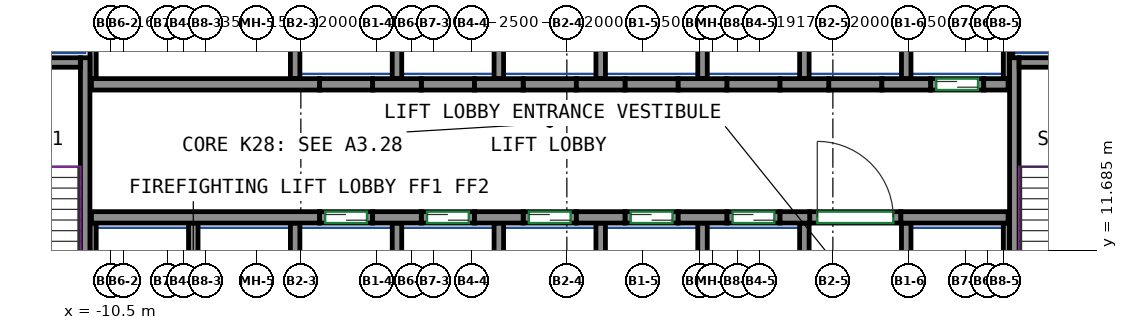
"""IFC4 building model, lengths in metres.
Left out: names, types, materials, properties, quantities, classifications, styles, units other than length and angle.
Written with IfcOpenShell. Run it as: python <this file> out.ifc"""

import sys

from ifc_helpers import new_model, si_unit, direction, frame, frame_2d, origin, place, context, subcontext, project, spatial, rectangle, extrude, source, transform, mapped, element, fill, save


model = new_model("IFC4")
c1 = context("Model", 3, precision=1e-05, world=origin(), true_north=direction((0.0, 1.0)))
c2 = subcontext(c1, "Body", "Model", "MODEL_VIEW")
j1 = project(units=[si_unit("LENGTHUNIT", "METRE"), si_unit("PLANEANGLEUNIT", "RADIAN")], contexts=[c1])
p1 = place(None, origin())
s1 = spatial("IfcSite", under=j1, at=p1, CompositionType="ELEMENT")
p2 = place(p1, origin())
s2 = spatial("IfcBuilding", under=s1, at=p2, CompositionType="ELEMENT")
p3 = place(p2, frame((0.0, 0.0, 116.6)))
s3 = spatial("IfcBuildingStorey", under=s2, at=p3, CompositionType="ELEMENT", Elevation=116.6)
m1 = source(origin(), c2, "Body", "SweptSolid", [
    extrude(rectangle(XDim=7.75, YDim=0.25, at=frame_2d((3.875, 0.0))), origin(), (0.0, 0.0, 1.0), 3.72),
])
p4 = place(p3, frame((-11.175, 9.0, 0.0), z_axis=(0.0, 0.0, 1.0), x_axis=(0.0, 1.0, 0.0)))
e1 = element("IfcWall", 1, at=p4, inside=s3, PredefinedType="SHEAR", context=c2, shape_type="MappedRepresentation", body=[
    mapped(m1, transform((0.0, 0.0, 0.0))),
])
m2 = source(origin(), c2, "Body", "SweptSolid", [
    extrude(rectangle(XDim=3.7, YDim=0.25, at=frame_2d((1.85, 0.0))), origin(), (0.0, 0.0, 1.0), 3.72),
])
p5 = place(p3, frame((-15.0, 16.625, 0.0), z_axis=(0.0, 0.0, 1.0), x_axis=(1.0, 0.0, 0.0)))
e2 = element("IfcWall", 2, at=p5, inside=s3, PredefinedType="SHEAR", context=c2, shape_type="MappedRepresentation", body=[
    mapped(m2, transform((0.0, 0.0, 0.0))),
])
p6 = place(p3, frame((13.275, 9.0, 0.0), z_axis=(0.0, 0.0, 1.0), x_axis=(0.0, 1.0, 0.0)))
e3 = element("IfcWall", 3, at=p6, inside=s3, PredefinedType="SHEAR", context=c2, shape_type="MappedRepresentation", body=[
    mapped(m1, transform((0.0, 0.0, 0.0))),
])
m3 = source(origin(), c2, "Body", "SweptSolid", [
    extrude(rectangle(XDim=3.7, YDim=0.25, at=frame_2d((1.85, 0.0))), origin(), (0.0, 0.0, 1.0), 3.72),
])
p7 = place(p3, frame((13.4, 16.625, 0.0), z_axis=(0.0, 0.0, 1.0), x_axis=(1.0, 0.0, 0.0)))
e4 = element("IfcWall", 4, at=p7, inside=s3, PredefinedType="SHEAR", context=c2, shape_type="MappedRepresentation", body=[
    mapped(m3, transform((0.0, 0.0, 0.0))),
])
m4 = source(origin(), c2, "Body", "SweptSolid", [
    extrude(rectangle(XDim=6.0, YDim=0.3, at=frame_2d((3.0, 0.0))), origin(), (0.0, 0.0, 1.0), 3.72),
])
p8 = place(p3, frame((-11.01, 12.55, 0.0), z_axis=(0.0, 0.0, 1.0), x_axis=(1.0, 0.0, 0.0)))
e5 = element("IfcWall", 5, at=p8, inside=s3, PredefinedType="SHEAR", context=c2, shape_type="MappedRepresentation", body=[
    mapped(m4, transform((0.0, 0.0, 0.0))),
])
m5 = source(origin(), c2, "Body", "SweptSolid", [
    extrude(rectangle(XDim=1.28, YDim=0.3, at=frame_2d((0.64, 0.0))), origin(), (0.0, 0.0, 1.0), 3.72),
])
for number, where, z_axis, x_axis in (
    (6, (-3.61, 12.55, 0.0), (0.0, 0.0, 1.0), (1.0, 0.0, 0.0)),
    (7, (-0.93, 12.55, 0.0), (0.0, 0.0, 1.0), (1.0, 0.0, 0.0)),
    (8, (1.75, 12.55, 0.0), (0.0, 0.0, 1.0), (1.0, 0.0, 0.0)),
    (9, (4.43, 12.55, 0.0), (0.0, 0.0, 1.0), (1.0, 0.0, 0.0)),
):
    element("IfcWall", number, at=place(p3, frame(where, z_axis=z_axis, x_axis=x_axis)), inside=s3, PredefinedType="SHEAR", context=c2, shape_type="MappedRepresentation", body=[
        mapped(m5, transform((0.0, 0.0, 0.0))),
    ])
m6 = source(origin(), c2, "Body", "SweptSolid", [
    extrude(rectangle(XDim=0.78, YDim=0.3, at=frame_2d((0.39, 0.0))), origin(), (0.0, 0.0, 1.0), 3.72),
])
p9 = place(p3, frame((7.11, 12.55, 0.0), z_axis=(0.0, 0.0, 1.0), x_axis=(1.0, 0.0, 0.0)))
e10 = element("IfcWall", 10, at=p9, inside=s3, PredefinedType="SHEAR", context=c2, shape_type="MappedRepresentation", body=[
    mapped(m6, transform((0.0, 0.0, 0.0))),
])
m7 = source(origin(), c2, "Body", "SweptSolid", [
    extrude(rectangle(XDim=2.82, YDim=0.3, at=frame_2d((1.41, 0.0))), origin(), (0.0, 0.0, 1.0), 3.72),
])
p10 = place(p3, frame((10.29, 12.55, 0.0), z_axis=(0.0, 0.0, 1.0), x_axis=(1.0, 0.0, 0.0)))
e11 = element("IfcWall", 11, at=p10, inside=s3, PredefinedType="SHEAR", context=c2, shape_type="MappedRepresentation", body=[
    mapped(m7, transform((0.0, 0.0, 0.0))),
])
p11 = place(p3, frame((-11.01, 16.05, 0.0), z_axis=(0.0, 0.0, 1.0), x_axis=(1.0, 0.0, 0.0)))
e12 = element("IfcWall", 12, at=p11, inside=s3, PredefinedType="SHEAR", context=c2, shape_type="MappedRepresentation", body=[
    mapped(m4, transform((0.0, 0.0, 0.0))),
])
for number, where, z_axis, x_axis in (
    (13, (-3.61, 16.05, 0.0), (0.0, 0.0, 1.0), (1.0, 0.0, 0.0)),
    (14, (-0.93, 16.05, 0.0), (0.0, 0.0, 1.0), (1.0, 0.0, 0.0)),
    (15, (1.75, 16.05, 0.0), (0.0, 0.0, 1.0), (1.0, 0.0, 0.0)),
    (16, (4.43, 16.05, 0.0), (0.0, 0.0, 1.0), (1.0, 0.0, 0.0)),
):
    element("IfcWall", number, at=place(p3, frame(where, z_axis=z_axis, x_axis=x_axis)), inside=s3, PredefinedType="SHEAR", context=c2, shape_type="MappedRepresentation", body=[
        mapped(m5, transform((0.0, 0.0, 0.0))),
    ])
m8 = source(origin(), c2, "Body", "SweptSolid", [
    extrude(rectangle(XDim=1.28, YDim=0.3, at=frame_2d((0.64, 0.0))), origin(), (0.0, 0.0, 1.0), 3.72),
])
p12 = place(p3, frame((7.11, 16.05, 0.0), z_axis=(0.0, 0.0, 1.0), x_axis=(1.0, 0.0, 0.0)))
e17 = element("IfcWall", 17, at=p12, inside=s3, PredefinedType="SHEAR", context=c2, shape_type="MappedRepresentation", body=[
    mapped(m8, transform((0.0, 0.0, 0.0))),
])
p13 = place(p3, frame((9.79, 16.05, 0.0), z_axis=(0.0, 0.0, 1.0), x_axis=(1.0, 0.0, 0.0)))
e18 = element("IfcWall", 18, at=p13, inside=s3, PredefinedType="SHEAR", context=c2, shape_type="MappedRepresentation", body=[
    mapped(m5, transform((0.0, 0.0, 0.0))),
])
m9 = source(origin(), c2, "Body", "SweptSolid", [
    extrude(rectangle(XDim=0.64, YDim=0.3, at=frame_2d((0.32, 0.0))), origin(), (0.0, 0.0, 1.0), 3.72),
])
p14 = place(p3, frame((12.47, 16.05, 0.0), z_axis=(0.0, 0.0, 1.0), x_axis=(1.0, 0.0, 0.0)))
e19 = element("IfcWall", 19, at=p14, inside=s3, PredefinedType="SHEAR", context=c2, shape_type="MappedRepresentation", body=[
    mapped(m9, transform((0.0, 0.0, 0.0))),
])
m10 = source(origin(), c2, "Body", "SweptSolid", [
    extrude(rectangle(XDim=1.4, YDim=0.3, at=frame_2d((0.7, 0.0))), origin(), (0.0, 0.0, 1.0), 3.72),
])
p15 = place(p3, frame((-5.01, 12.55, 0.0), z_axis=(0.0, 0.0, 1.0), x_axis=(1.0, 0.0, 0.0)))
e20 = element("IfcWall", 20, at=p15, inside=s3, PredefinedType="PARTITIONING", context=c2, shape_type="MappedRepresentation", body=[
    mapped(m10, transform((0.0, 0.0, 0.0))),
])
p16 = place(p15, frame((0.15, 0.0, 0.0)))
e21 = element("IfcOpeningElement", 21, at=p16, cuts=e20, PredefinedType="OPENING", context=c2, shape_type="SweptSolid", body=[
    extrude(rectangle(XDim=1.1, YDim=2.1, at=frame_2d((0.55, 1.05))), frame((0.0, 0.16, 0.0), z_axis=(0.0, -1.0, 0.0), x_axis=(1.0, 0.0, 0.0)), (0.0, 0.0, 1.0), 0.32),
])
m11 = source(origin(), c2, "Body", "SweptSolid", [
    extrude(rectangle(XDim=1.4, YDim=0.3, at=frame_2d((0.7, 0.0))), origin(), (0.0, 0.0, 1.0), 3.72),
])
p17 = place(p3, frame((-2.33, 12.55, 0.0), z_axis=(0.0, 0.0, 1.0), x_axis=(1.0, 0.0, 0.0)))
e22 = element("IfcWall", 22, at=p17, inside=s3, PredefinedType="PARTITIONING", context=c2, shape_type="MappedRepresentation", body=[
    mapped(m11, transform((0.0, 0.0, 0.0))),
])
p18 = place(p17, frame((0.15, 0.0, 0.0)))
e23 = element("IfcOpeningElement", 23, at=p18, cuts=e22, PredefinedType="OPENING", context=c2, shape_type="SweptSolid", body=[
    extrude(rectangle(XDim=1.1, YDim=2.1, at=frame_2d((0.55, 1.05))), frame((0.0, 0.16, 0.0), z_axis=(0.0, -1.0, 0.0), x_axis=(1.0, 0.0, 0.0)), (0.0, 0.0, 1.0), 0.32),
])
p19 = place(p3, frame((0.35, 12.55, 0.0), z_axis=(0.0, 0.0, 1.0), x_axis=(1.0, 0.0, 0.0)))
e24 = element("IfcWall", 24, at=p19, inside=s3, PredefinedType="PARTITIONING", context=c2, shape_type="MappedRepresentation", body=[
    mapped(m10, transform((0.0, 0.0, 0.0))),
])
p20 = place(p19, frame((0.15, 0.0, 0.0)))
e25 = element("IfcOpeningElement", 25, at=p20, cuts=e24, PredefinedType="OPENING", context=c2, shape_type="SweptSolid", body=[
    extrude(rectangle(XDim=1.1, YDim=2.1, at=frame_2d((0.55, 1.05))), frame((0.0, 0.16, 0.0), z_axis=(0.0, -1.0, 0.0), x_axis=(1.0, 0.0, 0.0)), (0.0, 0.0, 1.0), 0.32),
])
p21 = place(p3, frame((3.03, 12.55, 0.0), z_axis=(0.0, 0.0, 1.0), x_axis=(1.0, 0.0, 0.0)))
e26 = element("IfcWall", 26, at=p21, inside=s3, PredefinedType="PARTITIONING", context=c2, shape_type="MappedRepresentation", body=[
    mapped(m10, transform((0.0, 0.0, 0.0))),
])
p22 = place(p21, frame((0.15, 0.0, 0.0)))
e27 = element("IfcOpeningElement", 27, at=p22, cuts=e26, PredefinedType="OPENING", context=c2, shape_type="SweptSolid", body=[
    extrude(rectangle(XDim=1.1, YDim=2.1, at=frame_2d((0.55, 1.05))), frame((0.0, 0.16, 0.0), z_axis=(0.0, -1.0, 0.0), x_axis=(1.0, 0.0, 0.0)), (0.0, 0.0, 1.0), 0.32),
])
p23 = place(p3, frame((5.71, 12.55, 0.0), z_axis=(0.0, 0.0, 1.0), x_axis=(1.0, 0.0, 0.0)))
e28 = element("IfcWall", 28, at=p23, inside=s3, PredefinedType="PARTITIONING", context=c2, shape_type="MappedRepresentation", body=[
    mapped(m11, transform((0.0, 0.0, 0.0))),
])
p24 = place(p23, frame((0.15, 0.0, 0.0)))
e29 = element("IfcOpeningElement", 29, at=p24, cuts=e28, PredefinedType="OPENING", context=c2, shape_type="SweptSolid", body=[
    extrude(rectangle(XDim=1.1, YDim=2.1, at=frame_2d((0.55, 1.05))), frame((0.0, 0.16, 0.0), z_axis=(0.0, -1.0, 0.0), x_axis=(1.0, 0.0, 0.0)), (0.0, 0.0, 1.0), 0.32),
])
p25 = place(p3, frame((11.07, 16.05, 0.0), z_axis=(0.0, 0.0, 1.0), x_axis=(1.0, 0.0, 0.0)))
e30 = element("IfcWall", 30, at=p25, inside=s3, PredefinedType="PARTITIONING", context=c2, shape_type="MappedRepresentation", body=[
    mapped(m10, transform((0.0, 0.0, 0.0))),
])
p26 = place(p25, frame((0.15, 0.0, 0.0)))
e31 = element("IfcOpeningElement", 31, at=p26, cuts=e30, PredefinedType="OPENING", context=c2, shape_type="SweptSolid", body=[
    extrude(rectangle(XDim=1.1, YDim=2.1, at=frame_2d((0.55, 1.05))), frame((0.0, 0.16, 0.0), z_axis=(0.0, -1.0, 0.0), x_axis=(1.0, 0.0, 0.0)), (0.0, 0.0, 1.0), 0.32),
])
m12 = source(origin(), c2, "Body", "SweptSolid", [
    extrude(rectangle(XDim=2.4, YDim=0.3, at=frame_2d((1.2, 0.0))), origin(), (0.0, 0.0, 1.0), 3.72),
])
p27 = place(p3, frame((7.89, 12.55, 0.0), z_axis=(0.0, 0.0, 1.0), x_axis=(1.0, 0.0, 0.0)))
e32 = element("IfcWall", 32, at=p27, inside=s3, PredefinedType="PARTITIONING", context=c2, shape_type="MappedRepresentation", body=[
    mapped(m12, transform((0.0, 0.0, 0.0))),
])
p28 = place(p27, frame((0.2, 0.0, 0.0)))
e33 = element("IfcOpeningElement", 33, at=p28, cuts=e32, PredefinedType="OPENING", context=c2, shape_type="SweptSolid", body=[
    extrude(rectangle(XDim=2.0, YDim=2.1, at=frame_2d((1.0, 1.05))), frame((0.0, 0.16, 0.0), z_axis=(0.0, -1.0, 0.0), x_axis=(1.0, 0.0, 0.0)), (0.0, 0.0, 1.0), 0.32),
])
p29 = place(p3, frame((-5.01, 16.05, 0.0), z_axis=(0.0, 0.0, 1.0), x_axis=(1.0, 0.0, 0.0)))
e34 = element("IfcWall", 34, at=p29, inside=s3, PredefinedType="PARTITIONING", context=c2, shape_type="MappedRepresentation", body=[
    mapped(m10, transform((0.0, 0.0, 0.0))),
])
p30 = place(p3, frame((-2.33, 16.05, 0.0), z_axis=(0.0, 0.0, 1.0), x_axis=(1.0, 0.0, 0.0)))
e35 = element("IfcWall", 35, at=p30, inside=s3, PredefinedType="PARTITIONING", context=c2, shape_type="MappedRepresentation", body=[
    mapped(m11, transform((0.0, 0.0, 0.0))),
])
for number, where, z_axis, x_axis in (
    (36, (0.35, 16.05, 0.0), (0.0, 0.0, 1.0), (1.0, 0.0, 0.0)),
    (37, (3.03, 16.05, 0.0), (0.0, 0.0, 1.0), (1.0, 0.0, 0.0)),
):
    element("IfcWall", number, at=place(p3, frame(where, z_axis=z_axis, x_axis=x_axis)), inside=s3, PredefinedType="PARTITIONING", context=c2, shape_type="MappedRepresentation", body=[
        mapped(m10, transform((0.0, 0.0, 0.0))),
    ])
for number, where, z_axis, x_axis in (
    (38, (5.71, 16.05, 0.0), (0.0, 0.0, 1.0), (1.0, 0.0, 0.0)),
    (39, (8.39, 16.05, 0.0), (0.0, 0.0, 1.0), (1.0, 0.0, 0.0)),
):
    element("IfcWall", number, at=place(p3, frame(where, z_axis=z_axis, x_axis=x_axis)), inside=s3, PredefinedType="PARTITIONING", context=c2, shape_type="MappedRepresentation", body=[
        mapped(m11, transform((0.0, 0.0, 0.0))),
    ])
m13 = source(origin(), c2, "Body", "SweptSolid", [
    extrude(rectangle(XDim=3.275, YDim=0.165, at=frame_2d((1.638, 0.0))), origin(), (0.0, 0.0, 1.0), 3.72),
])
p31 = place(p3, frame((13.067, 16.2, 0.0), z_axis=(0.0, 0.0, 1.0), x_axis=(0.0, 1.0, 0.0)))
e40 = element("IfcWall", 40, at=p31, inside=s3, PredefinedType="PARTITIONING", context=c2, shape_type="MappedRepresentation", body=[
    mapped(m13, transform((0.0, 0.0, 0.0))),
])
m14 = source(origin(), c2, "Body", "SweptSolid", [
    extrude(rectangle(XDim=4.8, YDim=0.165, at=frame_2d((2.4, 0.0))), origin(), (0.0, 0.0, 1.0), 3.72),
])
p32 = place(p3, frame((-10.968, 16.2, 0.0), z_axis=(0.0, 0.0, 1.0), x_axis=(0.0, 1.0, 0.0)))
e41 = element("IfcWall", 41, at=p32, inside=s3, PredefinedType="PARTITIONING", context=c2, shape_type="MappedRepresentation", body=[
    mapped(m14, transform((0.0, 0.0, 0.0))),
])
m15 = source(origin(), c2, "Body", "SweptSolid", [
    extrude(rectangle(XDim=3.275, YDim=0.25, at=frame_2d((1.638, 0.0))), origin(), (0.0, 0.0, 1.0), 3.72),
])
p33 = place(p3, frame((10.43, 16.2, 0.0), z_axis=(0.0, 0.0, 1.0), x_axis=(0.0, 1.0, 0.0)))
e42 = element("IfcWall", 42, at=p33, inside=s3, PredefinedType="PARTITIONING", context=c2, shape_type="MappedRepresentation", body=[
    mapped(m15, transform((0.0, 0.0, 0.0))),
])
m16 = source(origin(), c2, "Body", "SweptSolid", [
    extrude(rectangle(XDim=2.725, YDim=0.085, at=frame_2d((1.363, 0.0))), origin(), (0.0, 0.0, 1.0), 3.72),
])
p34 = place(p3, frame((13.192, 16.75, 0.0), z_axis=(0.0, 0.0, 1.0), x_axis=(0.0, 1.0, 0.0)))
e43 = element("IfcWall", 43, at=p34, inside=s3, PredefinedType="PARTITIONING", context=c2, shape_type="MappedRepresentation", body=[
    mapped(m16, transform((0.0, 0.0, 0.0))),
])
for number, where, z_axis, x_axis in (
    (44, (2.39, 16.2, 0.0), (0.0, 0.0, 1.0), (0.0, 1.0, 0.0)),
    (45, (5.07, 16.2, 0.0), (0.0, 0.0, 1.0), (0.0, 1.0, 0.0)),
    (46, (7.75, 16.2, 0.0), (0.0, 0.0, 1.0), (0.0, 1.0, 0.0)),
    (47, (-0.29, 16.2, 0.0), (0.0, 0.0, 1.0), (0.0, 1.0, 0.0)),
    (48, (-2.97, 16.2, 0.0), (0.0, 0.0, 1.0), (0.0, 1.0, 0.0)),
    (49, (-5.65, 16.2, 0.0), (0.0, 0.0, 1.0), (0.0, 1.0, 0.0)),
):
    element("IfcWall", number, at=place(p3, frame(where, z_axis=z_axis, x_axis=x_axis)), inside=s3, PredefinedType="PARTITIONING", context=c2, shape_type="MappedRepresentation", body=[
        mapped(m15, transform((0.0, 0.0, 0.0))),
    ])
m17 = source(origin(), c2, "Body", "SweptSolid", [
    extrude(rectangle(XDim=3.4, YDim=0.25, at=frame_2d((1.7, 0.0))), origin(), (0.0, 0.0, 1.0), 3.72),
])
p35 = place(p3, frame((10.43, 9.0, 0.0), z_axis=(0.0, 0.0, 1.0), x_axis=(0.0, 1.0, 0.0)))
e50 = element("IfcWall", 50, at=p35, inside=s3, PredefinedType="PARTITIONING", context=c2, shape_type="MappedRepresentation", body=[
    mapped(m17, transform((0.0, 0.0, 0.0))),
])
m18 = source(origin(), c2, "Body", "SweptSolid", [
    extrude(rectangle(XDim=3.4, YDim=0.165, at=frame_2d((1.7, 0.0))), origin(), (0.0, 0.0, 1.0), 3.72),
])
p36 = place(p3, frame((13.067, 9.0, 0.0), z_axis=(0.0, 0.0, 1.0), x_axis=(0.0, 1.0, 0.0)))
e51 = element("IfcWall", 51, at=p36, inside=s3, PredefinedType="PARTITIONING", context=c2, shape_type="MappedRepresentation", body=[
    mapped(m18, transform((0.0, 0.0, 0.0))),
])
for number, where, z_axis, x_axis in (
    (52, (2.39, 9.0, 0.0), (0.0, 0.0, 1.0), (0.0, 1.0, 0.0)),
    (53, (5.07, 9.0, 0.0), (0.0, 0.0, 1.0), (0.0, 1.0, 0.0)),
    (54, (7.75, 9.0, 0.0), (0.0, 0.0, 1.0), (0.0, 1.0, 0.0)),
    (55, (-0.29, 9.0, 0.0), (0.0, 0.0, 1.0), (0.0, 1.0, 0.0)),
):
    element("IfcWall", number, at=place(p3, frame(where, z_axis=z_axis, x_axis=x_axis)), inside=s3, PredefinedType="PARTITIONING", context=c2, shape_type="MappedRepresentation", body=[
        mapped(m17, transform((0.0, 0.0, 0.0))),
    ])
p37 = place(p3, frame((-10.968, 9.0, 0.0), z_axis=(0.0, 0.0, 1.0), x_axis=(0.0, 1.0, 0.0)))
e56 = element("IfcWall", 56, at=p37, inside=s3, PredefinedType="PARTITIONING", context=c2, shape_type="MappedRepresentation", body=[
    mapped(m18, transform((0.0, 0.0, 0.0))),
])
for number, where, z_axis, x_axis in (
    (57, (-2.97, 9.0, 0.0), (0.0, 0.0, 1.0), (0.0, 1.0, 0.0)),
    (58, (-5.65, 9.0, 0.0), (0.0, 0.0, 1.0), (0.0, 1.0, 0.0)),
    (59, (-8.33, 9.0, 0.0), (0.0, 0.0, 1.0), (0.0, 1.0, 0.0)),
):
    element("IfcWall", number, at=place(p3, frame(where, z_axis=z_axis, x_axis=x_axis)), inside=s3, PredefinedType="PARTITIONING", context=c2, shape_type="MappedRepresentation", body=[
        mapped(m17, transform((0.0, 0.0, 0.0))),
    ])
p38 = place(p28, origin())
e60 = element("IfcDoor", 60, at=p38, inside=s3, OperationType="DOUBLE_DOOR_SINGLE_SWING", PredefinedType="DOOR", context=c2, shape_type="SweptSolid", body=[
    extrude(rectangle(XDim=2.0, YDim=2.1, at=frame_2d((1.0, 1.05))), frame((0.0, 0.025, 0.0), z_axis=(0.0, -1.0, 0.0), x_axis=(1.0, 0.0, 0.0)), (0.0, 0.0, 1.0), 0.05),
])
fill(e33, e60)
p39 = place(p16, origin())
e61 = element("IfcDoor", 61, at=p39, inside=s3, OperationType="DOUBLE_DOOR_SLIDING", PredefinedType="DOOR", context=c2, shape_type="SweptSolid", body=[
    extrude(rectangle(XDim=1.1, YDim=2.1, at=frame_2d((0.55, 1.05))), frame((0.0, 0.025, 0.0), z_axis=(0.0, -1.0, 0.0), x_axis=(1.0, 0.0, 0.0)), (0.0, 0.0, 1.0), 0.05),
])
fill(e21, e61)
p40 = place(p18, origin())
e62 = element("IfcDoor", 62, at=p40, inside=s3, OperationType="DOUBLE_DOOR_SLIDING", PredefinedType="DOOR", context=c2, shape_type="SweptSolid", body=[
    extrude(rectangle(XDim=1.1, YDim=2.1, at=frame_2d((0.55, 1.05))), frame((0.0, 0.025, 0.0), z_axis=(0.0, -1.0, 0.0), x_axis=(1.0, 0.0, 0.0)), (0.0, 0.0, 1.0), 0.05),
])
fill(e23, e62)
p41 = place(p20, origin())
e63 = element("IfcDoor", 63, at=p41, inside=s3, OperationType="DOUBLE_DOOR_SLIDING", PredefinedType="DOOR", context=c2, shape_type="SweptSolid", body=[
    extrude(rectangle(XDim=1.1, YDim=2.1, at=frame_2d((0.55, 1.05))), frame((0.0, 0.025, 0.0), z_axis=(0.0, -1.0, 0.0), x_axis=(1.0, 0.0, 0.0)), (0.0, 0.0, 1.0), 0.05),
])
fill(e25, e63)
p42 = place(p22, origin())
e64 = element("IfcDoor", 64, at=p42, inside=s3, OperationType="DOUBLE_DOOR_SLIDING", PredefinedType="DOOR", context=c2, shape_type="SweptSolid", body=[
    extrude(rectangle(XDim=1.1, YDim=2.1, at=frame_2d((0.55, 1.05))), frame((0.0, 0.025, 0.0), z_axis=(0.0, -1.0, 0.0), x_axis=(1.0, 0.0, 0.0)), (0.0, 0.0, 1.0), 0.05),
])
fill(e27, e64)
p43 = place(p24, origin())
e65 = element("IfcDoor", 65, at=p43, inside=s3, OperationType="DOUBLE_DOOR_SLIDING", PredefinedType="DOOR", context=c2, shape_type="SweptSolid", body=[
    extrude(rectangle(XDim=1.1, YDim=2.1, at=frame_2d((0.55, 1.05))), frame((0.0, 0.025, 0.0), z_axis=(0.0, -1.0, 0.0), x_axis=(1.0, 0.0, 0.0)), (0.0, 0.0, 1.0), 0.05),
])
fill(e29, e65)
p44 = place(p26, origin())
e66 = element("IfcDoor", 66, at=p44, inside=s3, OperationType="DOUBLE_DOOR_SLIDING", PredefinedType="DOOR", context=c2, shape_type="SweptSolid", body=[
    extrude(rectangle(XDim=1.1, YDim=2.1, at=frame_2d((0.55, 1.05))), frame((0.0, 0.025, 0.0), z_axis=(0.0, -1.0, 0.0), x_axis=(1.0, 0.0, 0.0)), (0.0, 0.0, 1.0), 0.05),
])
fill(e31, e66)
save(model, sys.argv[1])
